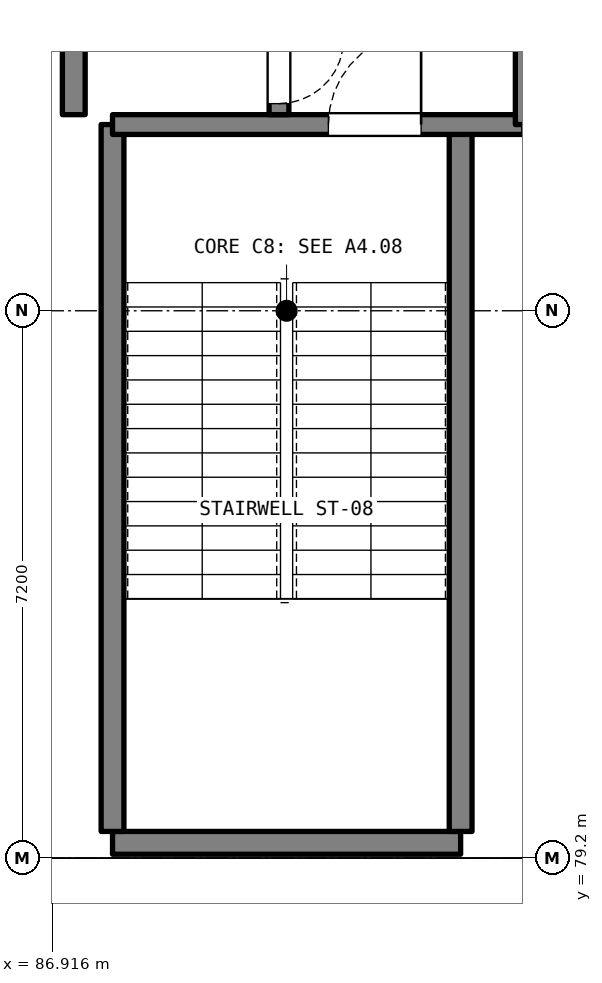
"""IFC4 building model, lengths in metres.
Left out: names, types, materials, properties, quantities, classifications, styles, units other than length and angle.
Written with IfcOpenShell. Run it as: python <this file> out.ifc"""

import sys

from ifc_helpers import new_model, si_unit, direction, frame, frame_2d, origin, place, context, subcontext, project, spatial, rectangle, extrude, element, fill, save


model = new_model("IFC4")
c1 = context("Model", 3, precision=1e-05, world=origin(), true_north=direction((0.0, 1.0)))
c2 = subcontext(c1, "Body", "Model", "MODEL_VIEW")
j1 = project(units=[si_unit("LENGTHUNIT", "METRE"), si_unit("PLANEANGLEUNIT", "RADIAN")], contexts=[c1])
p1 = place(None, origin())
s1 = spatial("IfcSite", under=j1, at=p1, CompositionType="ELEMENT")
p2 = place(p1, origin())
s2 = spatial("IfcBuilding", under=s1, at=p2, CompositionType="ELEMENT")
p3 = place(p2, frame((0.0, 0.0, 5.4)))
s3 = spatial("IfcBuildingStorey", under=s2, at=p3, CompositionType="ELEMENT", Elevation=5.4)
p4 = place(p3, frame((87.71, 79.4, 0.0), z_axis=(0.0, 0.0, 1.0), x_axis=(1.0, 0.0, 0.0)))
e1 = element("IfcWall", 1, at=p4, inside=s3, PredefinedType="SHEAR", context=c2, shape_type="SweptSolid", body=[
    extrude(rectangle(XDim=4.58, YDim=0.3, at=frame_2d((2.29, 0.0))), origin(), (0.0, 0.0, 1.0), 4.3),
])
for number, where, z_axis, x_axis in (
    (2, (87.71, 79.55, 0.0), (0.0, 0.0, 1.0), (0.0, 1.0, 0.0)),
    (3, (92.29, 79.55, 0.0), (0.0, 0.0, 1.0), (0.0, 1.0, 0.0)),
):
    element("IfcWall", number, at=place(p3, frame(where, z_axis=z_axis, x_axis=x_axis)), inside=s3, PredefinedType="SHEAR", context=c2, shape_type="SweptSolid", body=[
        extrude(rectangle(XDim=9.3, YDim=0.3, at=frame_2d((4.65, 0.0))), origin(), (0.0, 0.0, 1.0), 4.3),
    ])
p5 = place(p3, frame((87.71, 88.85, 0.0), z_axis=(0.0, 0.0, 1.0), x_axis=(1.0, 0.0, 0.0)))
e4 = element("IfcWall", 4, at=p5, inside=s3, PredefinedType="SHEAR", context=c2, shape_type="SweptSolid", body=[
    extrude(rectangle(XDim=5.41, YDim=0.26, at=frame_2d((2.705, 0.0))), origin(), (0.0, 0.0, 1.0), 4.3),
])
p6 = place(p5, frame((2.84, 0.0, 0.0)))
e5 = element("IfcOpeningElement", 5, at=p6, cuts=e4, PredefinedType="OPENING", context=c2, shape_type="SweptSolid", body=[
    extrude(rectangle(XDim=1.22, YDim=2.15, at=frame_2d((0.61, 1.075))), frame((0.0, 0.14, 0.0), z_axis=(0.0, -1.0, 0.0), x_axis=(1.0, 0.0, 0.0)), (0.0, 0.0, 1.0), 0.28),
])
p7 = place(p3, frame((87.2, 88.98, 0.0), z_axis=(0.0, 0.0, 1.0), x_axis=(0.0, 1.0, 0.0)))
e6 = element("IfcWall", 6, at=p7, inside=s3, PredefinedType="SHEAR", context=c2, shape_type="SweptSolid", body=[
    extrude(rectangle(XDim=4.32, YDim=0.3, at=frame_2d((2.16, 0.0))), origin(), (0.0, 0.0, 1.0), 4.3),
])
p8 = place(p3, frame((89.9, 93.3, 0.0), z_axis=(0.0, 0.0, 1.0), x_axis=(0.0, -1.0, 0.0)))
e7 = element("IfcWall", 7, at=p8, inside=s3, PredefinedType="SHEAR", context=c2, shape_type="SweptSolid", body=[
    extrude(rectangle(XDim=4.32, YDim=0.26, at=frame_2d((2.16, 0.0))), origin(), (0.0, 0.0, 1.0), 4.3),
])
p9 = place(p8, frame((1.0, 0.0, 0.0)))
e8 = element("IfcOpeningElement", 8, at=p9, cuts=e7, PredefinedType="OPENING", context=c2, shape_type="SweptSolid", body=[
    extrude(rectangle(XDim=1.2, YDim=2.15, at=frame_2d((0.6, 1.075))), frame((0.0, 0.14, 0.0), z_axis=(0.0, -1.0, 0.0), x_axis=(1.0, 0.0, 0.0)), (0.0, 0.0, 1.0), 0.28),
])
p10 = place(p8, frame((3.325, 0.0, 0.0)))
e9 = element("IfcOpeningElement", 9, at=p10, cuts=e7, PredefinedType="OPENING", context=c2, shape_type="SweptSolid", body=[
    extrude(rectangle(XDim=0.85, YDim=2.05, at=frame_2d((0.425, 1.025))), frame((0.0, 0.14, 0.0), z_axis=(0.0, -1.0, 0.0), x_axis=(1.0, 0.0, 0.0)), (0.0, 0.0, 1.0), 0.28),
])
p11 = place(p3, frame((93.12, 93.3, 0.0), z_axis=(0.0, 0.0, 1.0), x_axis=(0.0, -1.0, 0.0)))
e10 = element("IfcWall", 10, at=p11, inside=s3, PredefinedType="SHEAR", context=c2, shape_type="SweptSolid", body=[
    extrude(rectangle(XDim=4.45, YDim=0.22, at=frame_2d((2.225, 0.0))), origin(), (0.0, 0.0, 1.0), 4.3),
])
p12 = place(p11, frame((1.55, 0.0, 0.0)))
e11 = element("IfcOpeningElement", 11, at=p12, cuts=e10, PredefinedType="OPENING", context=c2, shape_type="SweptSolid", body=[
    extrude(rectangle(XDim=1.6, YDim=2.2, at=frame_2d((0.8, 1.1))), frame((0.0, 0.12, 0.0), z_axis=(0.0, -1.0, 0.0), x_axis=(1.0, 0.0, 0.0)), (0.0, 0.0, 1.0), 0.24),
])
p13 = place(p6, origin())
e12 = element("IfcDoor", 12, at=p13, inside=s3, OperationType="SINGLE_SWING_RIGHT", PredefinedType="DOOR", context=c2, shape_type="SweptSolid", body=[
    extrude(rectangle(XDim=1.22, YDim=2.15, at=frame_2d((0.61, 1.075))), frame((0.0, 0.025, 0.0), z_axis=(0.0, -1.0, 0.0), x_axis=(1.0, 0.0, 0.0)), (0.0, 0.0, 1.0), 0.05),
])
fill(e5, e12)
p14 = place(p10, origin())
e13 = element("IfcDoor", 13, at=p14, inside=s3, OperationType="SINGLE_SWING_LEFT", PredefinedType="DOOR", context=c2, shape_type="SweptSolid", body=[
    extrude(rectangle(XDim=0.85, YDim=2.05, at=frame_2d((0.425, 1.025))), frame((0.0, 0.025, 0.0), z_axis=(0.0, -1.0, 0.0), x_axis=(1.0, 0.0, 0.0)), (0.0, 0.0, 1.0), 0.05),
])
fill(e9, e13)
save(model, sys.argv[1])
